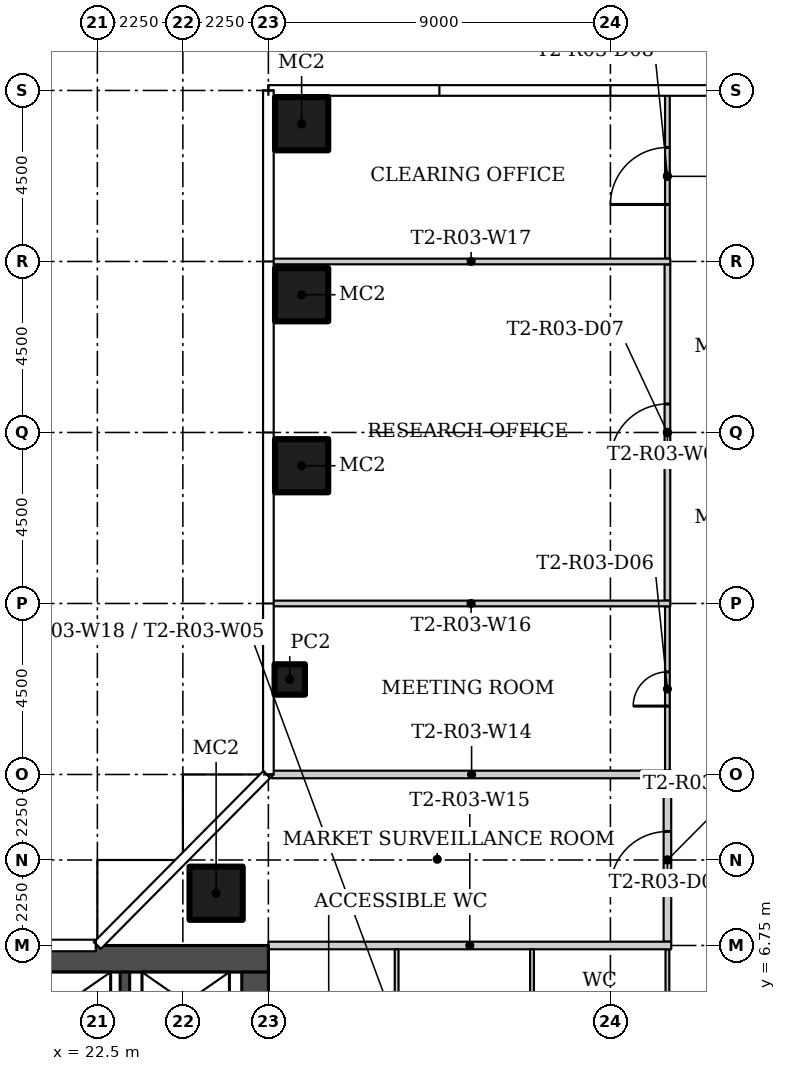
"""IFC4 building model, lengths in metres.
Left out: names, types, materials, properties, quantities, classifications, styles, units other than length and angle.
Written with IfcOpenShell. Run it as: python <this file> out.ifc"""

import sys

from ifc_helpers import new_model, si_unit, direction, frame, frame_2d, origin, origin_2d, place, context, subcontext, project, spatial, rectangle, hollow_rectangle, extrude, element, fill, save


model = new_model("IFC4")
c1 = context("Model", 3, precision=1e-05, world=origin(), true_north=direction((0.0, 1.0)))
c2 = subcontext(c1, "Body", "Model", "MODEL_VIEW")
j1 = project(units=[si_unit("LENGTHUNIT", "METRE"), si_unit("PLANEANGLEUNIT", "RADIAN")], contexts=[c1])
p1 = place(None, origin())
s1 = spatial("IfcSite", under=j1, at=p1, CompositionType="ELEMENT")
p2 = place(p1, origin())
s2 = spatial("IfcBuilding", under=s1, at=p2, CompositionType="ELEMENT")
p3 = place(p2, frame((0.0, 0.0, 42.0)))
s3 = spatial("IfcBuildingStorey", under=s2, at=p3, CompositionType="ELEMENT", Elevation=42.0)
p4 = place(p3, frame((25.625, 8.125, 0.0)))
e1 = element("IfcColumn", 1, at=p4, inside=s3, PredefinedType="COLUMN", context=c2, shape_type="SweptSolid", body=[
    extrude(hollow_rectangle(XDim=1.4, YDim=1.4, WallThickness=0.05, at=origin_2d()), origin(), (0.0, 0.0, 1.0), 3.55),
])
p5 = place(p3, frame((27.562, 13.75, 0.0)))
e2 = element("IfcColumn", 2, at=p5, inside=s3, PredefinedType="COLUMN", context=c2, shape_type="SweptSolid", body=[
    extrude(hollow_rectangle(XDim=0.8, YDim=0.8, WallThickness=0.025, at=origin_2d()), origin(), (0.0, 0.0, 1.0), 3.55),
])
for number, where in (
    (3, (27.875, 19.375, 0.0)),
    (4, (27.875, 23.875, 0.0)),
    (5, (27.875, 28.375, 0.0)),
):
    element("IfcColumn", number, at=place(p3, frame(where)), inside=s3, PredefinedType="COLUMN", context=c2, shape_type="SweptSolid", body=[
        extrude(hollow_rectangle(XDim=1.4, YDim=1.4, WallThickness=0.05, at=origin_2d()), origin(), (0.0, 0.0, 1.0), 3.55),
    ])
p6 = place(p3, frame((37.5, 6.85, 0.0), z_axis=(0.0, 0.0, 1.0), x_axis=(0.0, 1.0, 0.0)))
e6 = element("IfcWall", 6, at=p6, inside=s3, PredefinedType="PARTITIONING", context=c2, shape_type="SweptSolid", body=[
    extrude(rectangle(XDim=4.3, YDim=0.2, at=frame_2d((2.15, 0.0))), origin(), (0.0, 0.0, 1.0), 3.55),
])
p7 = place(p6, frame((1.4, 0.0, 0.0)))
e7 = element("IfcOpeningElement", 7, at=p7, cuts=e6, PredefinedType="OPENING", context=c2, shape_type="SweptSolid", body=[
    extrude(rectangle(XDim=1.5, YDim=2.1, at=frame_2d((0.75, 1.05))), frame((0.0, 0.11, 0.0), z_axis=(0.0, -1.0, 0.0), x_axis=(1.0, 0.0, 0.0)), (0.0, 0.0, 1.0), 0.22),
])
p8 = place(p3, frame((37.5, 24.825, 0.0), z_axis=(0.0, 0.0, 1.0), x_axis=(0.0, 1.0, 0.0)))
e8 = element("IfcWall", 8, at=p8, inside=s3, PredefinedType="PARTITIONING", context=c2, shape_type="SweptSolid", body=[
    extrude(rectangle(XDim=4.33, YDim=0.125, at=frame_2d((2.165, 0.0))), origin(), (0.0, 0.0, 1.0), 3.55),
])
p9 = place(p8, frame((1.425, 0.0, 0.0)))
e9 = element("IfcOpeningElement", 9, at=p9, cuts=e8, PredefinedType="OPENING", context=c2, shape_type="SweptSolid", body=[
    extrude(rectangle(XDim=1.5, YDim=2.1, at=frame_2d((0.75, 1.05))), frame((0.0, 0.073, 0.0), z_axis=(0.0, -1.0, 0.0), x_axis=(1.0, 0.0, 0.0)), (0.0, 0.0, 1.0), 0.145),
])
p10 = place(p3, frame((37.5, 11.35, 0.0), z_axis=(0.0, 0.0, 1.0), x_axis=(0.0, 1.0, 0.0)))
e10 = element("IfcWall", 10, at=p10, inside=s3, PredefinedType="PARTITIONING", context=c2, shape_type="SweptSolid", body=[
    extrude(rectangle(XDim=4.325, YDim=0.125, at=frame_2d((2.163, 0.0))), origin(), (0.0, 0.0, 1.0), 3.55),
])
p11 = place(p10, frame((1.7, 0.0, 0.0)))
e11 = element("IfcOpeningElement", 11, at=p11, cuts=e10, PredefinedType="OPENING", context=c2, shape_type="SweptSolid", body=[
    extrude(rectangle(XDim=0.9, YDim=2.1, at=frame_2d((0.45, 1.05))), frame((0.0, 0.073, 0.0), z_axis=(0.0, -1.0, 0.0), x_axis=(1.0, 0.0, 0.0)), (0.0, 0.0, 1.0), 0.145),
])
p12 = place(p3, frame((37.5, 15.825, 0.0), z_axis=(0.0, 0.0, 1.0), x_axis=(0.0, 1.0, 0.0)))
e12 = element("IfcWall", 12, at=p12, inside=s3, PredefinedType="PARTITIONING", context=c2, shape_type="SweptSolid", body=[
    extrude(rectangle(XDim=8.85, YDim=0.15, at=frame_2d((4.425, 0.0))), origin(), (0.0, 0.0, 1.0), 3.55),
])
p13 = place(p12, frame((3.675, 0.0, 0.0)))
e13 = element("IfcOpeningElement", 13, at=p13, cuts=e12, PredefinedType="OPENING", context=c2, shape_type="SweptSolid", body=[
    extrude(rectangle(XDim=1.5, YDim=2.1, at=frame_2d((0.75, 1.05))), frame((0.0, 0.085, 0.0), z_axis=(0.0, -1.0, 0.0), x_axis=(1.0, 0.0, 0.0)), (0.0, 0.0, 1.0), 0.17),
])
p14 = place(p3, frame((37.5, 2.5, 0.0), z_axis=(0.0, 0.0, 1.0), x_axis=(0.0, 1.0, 0.0)))
e14 = element("IfcWall", 14, at=p14, inside=s3, PredefinedType="PARTITIONING", context=c2, shape_type="SweptSolid", body=[
    extrude(rectangle(XDim=4.15, YDim=0.1, at=frame_2d((2.075, 0.0))), origin(), (0.0, 0.0, 1.0), 3.55),
])
p15 = place(p3, frame((37.6, 11.25, 0.0), z_axis=(0.0, 0.0, 1.0), x_axis=(-1.0, 0.0, 0.0)))
e15 = element("IfcWall", 15, at=p15, inside=s3, PredefinedType="PARTITIONING", context=c2, shape_type="SweptSolid", body=[
    extrude(rectangle(XDim=10.505, YDim=0.2, at=frame_2d((5.252, 0.0))), origin(), (0.0, 0.0, 1.0), 3.55),
])
p16 = place(p3, frame((27.0, 6.75, 0.0)))
e16 = element("IfcWall", 16, at=p16, inside=s3, PredefinedType="PARTITIONING", context=c2, shape_type="SweptSolid", body=[
    extrude(rectangle(XDim=10.6, YDim=0.2, at=frame_2d((5.3, 0.0))), origin(), (0.0, 0.0, 1.0), 3.55),
])
for number, where, z_axis, x_axis in (
    (17, (37.575, 15.75, 0.0), (0.0, 0.0, 1.0), (-1.0, 0.0, 0.0)),
    (18, (37.575, 24.75, 0.0), (0.0, 0.0, 1.0), (-1.0, 0.0, 0.0)),
):
    element("IfcWall", number, at=place(p3, frame(where, z_axis=z_axis, x_axis=x_axis)), inside=s3, PredefinedType="PARTITIONING", context=c2, shape_type="SweptSolid", body=[
        extrude(rectangle(XDim=10.48, YDim=0.15, at=frame_2d((5.24, 0.0))), origin(), (0.0, 0.0, 1.0), 3.55),
    ])
for number, where, z_axis, x_axis in (
    (19, (33.938, 6.65, 0.0), (0.0, 0.0, 1.0), (0.0, -1.0, 0.0)),
    (20, (30.375, 6.65, 0.0), (0.0, 0.0, 1.0), (0.0, -1.0, 0.0)),
):
    element("IfcWall", number, at=place(p3, frame(where, z_axis=z_axis, x_axis=x_axis)), inside=s3, PredefinedType="PARTITIONING", context=c2, shape_type="SweptSolid", body=[
        extrude(rectangle(XDim=4.15, YDim=0.1, at=frame_2d((2.075, 0.0))), origin(), (0.0, 0.0, 1.0), 3.55),
    ])
p17 = place(p3, frame((13.5, 6.4, 0.0)))
e21 = element("IfcWall", 21, at=p17, inside=s3, PredefinedType="SHEAR", context=c2, shape_type="SweptSolid", body=[
    extrude(rectangle(XDim=13.5, YDim=0.7, at=frame_2d((6.75, 0.0))), origin(), (0.0, 0.0, 1.0), 3.55),
])
p18 = place(p3, frame((26.65, 6.05, 0.0), z_axis=(0.0, 0.0, 1.0), x_axis=(0.0, -1.0, 0.0)))
e22 = element("IfcWall", 22, at=p18, inside=s3, PredefinedType="SHEAR", context=c2, shape_type="SweptSolid", body=[
    extrude(rectangle(XDim=12.1, YDim=0.7, at=frame_2d((6.05, 0.0))), origin(), (0.0, 0.0, 1.0), 3.55),
])
p19 = place(p18, frame((10.1, 0.0, 0.0)))
e23 = element("IfcOpeningElement", 23, at=p19, cuts=e22, PredefinedType="OPENING", context=c2, shape_type="SweptSolid", body=[
    extrude(rectangle(XDim=1.2, YDim=2.1, at=frame_2d((0.6, 1.05))), frame((0.0, 0.36, 0.0), z_axis=(0.0, -1.0, 0.0), x_axis=(1.0, 0.0, 0.0)), (0.0, 0.0, 1.0), 0.72),
])
p20 = place(p18, frame((3.9, 0.0, 0.0)))
e24 = element("IfcOpeningElement", 24, at=p20, cuts=e22, PredefinedType="OPENING", context=c2, shape_type="SweptSolid", body=[
    extrude(rectangle(XDim=1.8, YDim=2.4, at=frame_2d((0.9, 1.2))), frame((0.0, 0.36, 0.0), z_axis=(0.0, -1.0, 0.0), x_axis=(1.0, 0.0, 0.0)), (0.0, 0.0, 1.0), 0.72),
])
p21 = place(p3, frame((23.225, 3.25, 0.0), z_axis=(0.0, 0.0, 1.0), x_axis=(0.0, 1.0, 0.0)))
e25 = element("IfcWall", 25, at=p21, inside=s3, PredefinedType="SHEAR", context=c2, shape_type="SweptSolid", body=[
    extrude(rectangle(XDim=2.8, YDim=0.25, at=frame_2d((1.4, 0.0))), origin(), (0.0, 0.0, 1.0), 3.55),
])
p22 = place(p7, origin())
e26 = element("IfcDoor", 26, at=p22, inside=s3, OperationType="DOUBLE_DOOR_SINGLE_SWING", PredefinedType="DOOR", context=c2, shape_type="SweptSolid", body=[
    extrude(rectangle(XDim=1.5, YDim=2.1, at=frame_2d((0.75, 1.05))), frame((0.0, 0.025, 0.0), z_axis=(0.0, -1.0, 0.0), x_axis=(1.0, 0.0, 0.0)), (0.0, 0.0, 1.0), 0.05),
])
fill(e7, e26)
p23 = place(p11, origin())
e27 = element("IfcDoor", 27, at=p23, inside=s3, OperationType="SINGLE_SWING_RIGHT", PredefinedType="DOOR", context=c2, shape_type="SweptSolid", body=[
    extrude(rectangle(XDim=0.9, YDim=2.1, at=frame_2d((0.45, 1.05))), frame((0.0, 0.025, 0.0), z_axis=(0.0, -1.0, 0.0), x_axis=(1.0, 0.0, 0.0)), (0.0, 0.0, 1.0), 0.05),
])
fill(e11, e27)
p24 = place(p13, origin())
e28 = element("IfcDoor", 28, at=p24, inside=s3, OperationType="DOUBLE_DOOR_SINGLE_SWING", PredefinedType="DOOR", context=c2, shape_type="SweptSolid", body=[
    extrude(rectangle(XDim=1.5, YDim=2.1, at=frame_2d((0.75, 1.05))), frame((0.0, 0.025, 0.0), z_axis=(0.0, -1.0, 0.0), x_axis=(1.0, 0.0, 0.0)), (0.0, 0.0, 1.0), 0.05),
])
fill(e13, e28)
p25 = place(p9, origin())
e29 = element("IfcDoor", 29, at=p25, inside=s3, OperationType="DOUBLE_DOOR_SINGLE_SWING", PredefinedType="DOOR", context=c2, shape_type="SweptSolid", body=[
    extrude(rectangle(XDim=1.5, YDim=2.1, at=frame_2d((0.75, 1.05))), frame((0.0, 0.025, 0.0), z_axis=(0.0, -1.0, 0.0), x_axis=(1.0, 0.0, 0.0)), (0.0, 0.0, 1.0), 0.05),
])
fill(e9, e29)
save(model, sys.argv[1])
